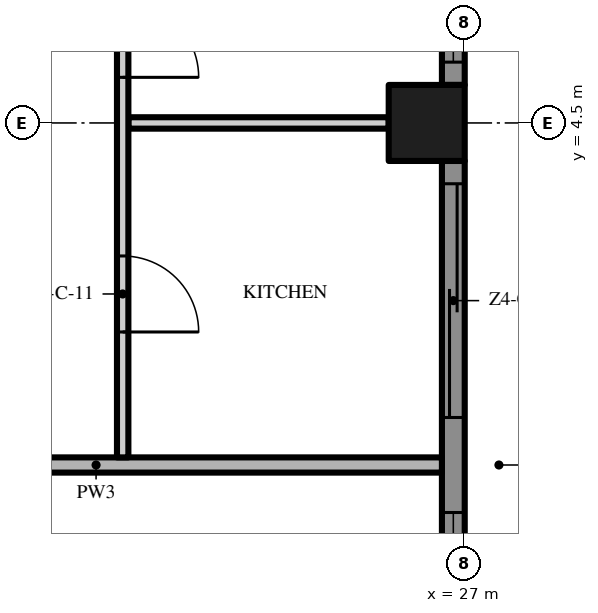
"""IFC4 building model, lengths in metres.
Left out: names, types, materials, properties, quantities, classifications, styles, units other than length and angle.
Written with IfcOpenShell. Run it as: python <this file> out.ifc"""

import sys

from ifc_helpers import new_model, si_unit, direction, frame, frame_2d, origin, origin_2d, place, context, subcontext, project, spatial, polyline, rectangle, outline, extrude, element, fill, save


model = new_model("IFC4")
c1 = context("Model", 3, precision=1e-05, world=origin(), true_north=direction((0.0, 1.0)))
c2 = subcontext(c1, "Body", "Model", "MODEL_VIEW")
j1 = project(units=[si_unit("LENGTHUNIT", "METRE"), si_unit("PLANEANGLEUNIT", "RADIAN")], contexts=[c1])
p1 = place(None, origin())
s1 = spatial("IfcSite", under=j1, at=p1, CompositionType="ELEMENT")
p2 = place(p1, origin())
s2 = spatial("IfcBuilding", under=s1, at=p2, CompositionType="ELEMENT")
p3 = place(p2, frame((0.0, 0.0, 207.2)))
s3 = spatial("IfcBuildingStorey", under=s2, at=p3, CompositionType="ELEMENT", Elevation=207.2)
p4 = place(p3, frame((26.5, 4.5, 0.0), z_axis=(0.0, 0.0, 1.0), x_axis=(1.0, 0.0, 0.0)))
e1 = element("IfcColumn", 1, at=p4, inside=s3, PredefinedType="COLUMN", context=c2, shape_type="SweptSolid", body=[
    extrude(rectangle(XDim=1.0, YDim=1.0, at=origin_2d()), origin(), (0.0, 0.0, 1.0), 3.5),
])
p5 = place(p3, frame((26.85, 4.0, 0.0), z_axis=(0.0, 0.0, 1.0), x_axis=(0.0, -1.0, 0.0)))
e2 = element("IfcWall", 2, at=p5, inside=s3, PredefinedType="SOLIDWALL", context=c2, shape_type="SweptSolid", body=[
    extrude(rectangle(XDim=8.0, YDim=0.3, at=frame_2d((4.0, 0.0))), origin(), (0.0, 0.0, 1.0), 3.5),
])
p6 = place(p5, frame((4.625, 0.0, 0.45)))
e3 = element("IfcOpeningElement", 3, at=p6, cuts=e2, PredefinedType="OPENING", context=c2, shape_type="SweptSolid", body=[
    extrude(rectangle(XDim=3.075, YDim=2.65, at=frame_2d((1.538, 1.325))), frame((0.0, 0.16, 0.0), z_axis=(0.0, -1.0, 0.0), x_axis=(1.0, 0.0, 0.0)), (0.0, 0.0, 1.0), 0.32),
])
p7 = place(p5, frame((0.3, 0.0, 0.0)))
e4 = element("IfcOpeningElement", 4, at=p7, cuts=e2, PredefinedType="OPENING", context=c2, shape_type="SweptSolid", body=[
    extrude(rectangle(XDim=3.075, YDim=2.4, at=frame_2d((1.538, 1.2))), frame((0.0, 0.16, 0.0), z_axis=(0.0, -1.0, 0.0), x_axis=(1.0, 0.0, 0.0)), (0.0, 0.0, 1.0), 0.32),
])
p8 = place(p3, frame((26.85, 13.0, 0.0), z_axis=(0.0, 0.0, 1.0), x_axis=(0.0, -1.0, 0.0)))
e5 = element("IfcWall", 5, at=p8, inside=s3, PredefinedType="SOLIDWALL", context=c2, shape_type="SweptSolid", body=[
    extrude(rectangle(XDim=8.0, YDim=0.3, at=frame_2d((4.0, 0.0))), origin(), (0.0, 0.0, 1.0), 3.5),
])
p9 = place(p8, frame((4.625, 0.0, 0.45)))
e6 = element("IfcOpeningElement", 6, at=p9, cuts=e5, PredefinedType="OPENING", context=c2, shape_type="SweptSolid", body=[
    extrude(rectangle(XDim=3.075, YDim=2.65, at=frame_2d((1.538, 1.325))), frame((0.0, 0.16, 0.0), z_axis=(0.0, -1.0, 0.0), x_axis=(1.0, 0.0, 0.0)), (0.0, 0.0, 1.0), 0.32),
])
p10 = place(p8, frame((0.3, 0.0, 0.45)))
e7 = element("IfcOpeningElement", 7, at=p10, cuts=e5, PredefinedType="OPENING", context=c2, shape_type="SweptSolid", body=[
    extrude(rectangle(XDim=3.075, YDim=2.65, at=frame_2d((1.538, 1.325))), frame((0.0, 0.16, 0.0), z_axis=(0.0, -1.0, 0.0), x_axis=(1.0, 0.0, 0.0)), (0.0, 0.0, 1.0), 0.32),
])
p11 = place(p3, origin())
e8 = element("IfcWall", 8, at=p11, inside=s3, PredefinedType="USERDEFINED", context=c2, shape_type="SweptSolid", body=[
    extrude(outline(polyline([(27.951, -18.0), (28.612, -16.5), (29.345, -15.0), (29.869, -13.5), (30.0, -12.375), (29.985, -12.0), (29.649, -10.5), (28.988, -9.0), (28.255, -7.5), (27.731, -6.0), (27.6, -4.875), (27.615, -4.5), (27.951, -3.0), (28.612, -1.5), (29.345, 0.0), (29.869, 1.5), (30.0, 2.625), (29.985, 3.0), (29.649, 4.5), (28.988, 6.0), (28.255, 7.5), (27.731, 9.0), (27.6, 10.125), (27.615, 10.5), (27.951, 12.0), (28.612, 13.5), (29.345, 15.0), (29.869, 16.5), (30.0, 17.625), (29.985, 18.0), (29.735, 17.99), (29.749, 17.635), (29.624, 16.556), (29.114, 15.096), (28.385, 13.605), (27.713, 12.079), (27.366, 10.533), (27.349, 10.115), (27.486, 8.944), (28.024, 7.404), (28.761, 5.895), (29.41, 4.421), (29.736, 2.967), (29.749, 2.635), (29.624, 1.556), (29.114, 0.096), (28.385, -1.395), (27.713, -2.921), (27.366, -4.467), (27.349, -4.885), (27.486, -6.056), (28.024, -7.596), (28.761, -9.105), (29.41, -10.579), (29.736, -12.033), (29.749, -12.365), (29.624, -13.444), (29.114, -14.904), (28.385, -16.395), (27.723, -17.899), (27.951, -18.0)])), origin(), (0.0, 0.0, 1.0), 0.9),
])
p12 = place(p3, frame((17.6, 0.0, 0.0), z_axis=(0.0, 0.0, 1.0), x_axis=(1.0, 0.0, 0.0)))
e9 = element("IfcWall", 9, at=p12, inside=s3, PredefinedType="PARTITIONING", context=c2, shape_type="SweptSolid", body=[
    extrude(rectangle(XDim=9.1, YDim=0.2, at=frame_2d((4.55, 0.0))), origin(), (0.0, 0.0, 1.0), 3.5),
])
p13 = place(p3, frame((22.575, 4.5, 0.0), z_axis=(0.0, 0.0, 1.0), x_axis=(1.0, 0.0, 0.0)))
e10 = element("IfcWall", 10, at=p13, inside=s3, PredefinedType="PARTITIONING", context=c2, shape_type="SweptSolid", body=[
    extrude(rectangle(XDim=3.425, YDim=0.15, at=frame_2d((1.712, 0.0))), origin(), (0.0, 0.0, 1.0), 3.5),
])
p14 = place(p3, frame((22.5, 17.5, 0.0), z_axis=(0.0, 0.0, 1.0), x_axis=(0.0, -1.0, 0.0)))
e11 = element("IfcWall", 11, at=p14, inside=s3, PredefinedType="PARTITIONING", context=c2, shape_type="SweptSolid", body=[
    extrude(rectangle(XDim=17.4, YDim=0.15, at=frame_2d((8.7, 0.0))), origin(), (0.0, 0.0, 1.0), 3.5),
])
p15 = place(p14, frame((14.75, 0.0, 0.0)))
e12 = element("IfcOpeningElement", 12, at=p15, cuts=e11, PredefinedType="OPENING", context=c2, shape_type="SweptSolid", body=[
    extrude(rectangle(XDim=1.0, YDim=2.4, at=frame_2d((0.5, 1.2))), frame((0.0, 0.085, 0.0), z_axis=(0.0, -1.0, 0.0), x_axis=(1.0, 0.0, 0.0)), (0.0, 0.0, 1.0), 0.17),
])
p16 = place(p14, frame((11.4, 0.0, 0.0)))
e13 = element("IfcOpeningElement", 13, at=p16, cuts=e11, PredefinedType="OPENING", context=c2, shape_type="SweptSolid", body=[
    extrude(rectangle(XDim=1.0, YDim=2.4, at=frame_2d((0.5, 1.2))), frame((0.0, 0.085, 0.0), z_axis=(0.0, -1.0, 0.0), x_axis=(1.0, 0.0, 0.0)), (0.0, 0.0, 1.0), 0.17),
])
p17 = place(p14, frame((4.25, 0.0, 0.0)))
e14 = element("IfcOpeningElement", 14, at=p17, cuts=e11, PredefinedType="OPENING", context=c2, shape_type="SweptSolid", body=[
    extrude(rectangle(XDim=1.0, YDim=2.4, at=frame_2d((0.5, 1.2))), frame((0.0, 0.085, 0.0), z_axis=(0.0, -1.0, 0.0), x_axis=(1.0, 0.0, 0.0)), (0.0, 0.0, 1.0), 0.17),
])
p18 = place(p6, origin())
e15 = element("IfcWindow", 15, at=p18, inside=s3, PartitioningType="SINGLE_PANEL", PredefinedType="WINDOW", context=c2, shape_type="SweptSolid", body=[
    extrude(rectangle(XDim=3.075, YDim=2.65, at=frame_2d((1.538, 1.325))), frame((0.0, 0.03, 0.0), z_axis=(0.0, -1.0, 0.0), x_axis=(1.0, 0.0, 0.0)), (0.0, 0.0, 1.0), 0.06),
])
fill(e3, e15)
p19 = place(p7, origin())
e16 = element("IfcDoor", 16, at=p19, inside=s3, OperationType="SINGLE_SWING_LEFT", PredefinedType="DOOR", context=c2, shape_type="SweptSolid", body=[
    extrude(rectangle(XDim=3.075, YDim=2.4, at=frame_2d((1.538, 1.2))), frame((0.0, 0.025, 0.0), z_axis=(0.0, -1.0, 0.0), x_axis=(1.0, 0.0, 0.0)), (0.0, 0.0, 1.0), 0.05),
])
fill(e4, e16)
p20 = place(p9, origin())
e17 = element("IfcWindow", 17, at=p20, inside=s3, PartitioningType="SINGLE_PANEL", PredefinedType="WINDOW", context=c2, shape_type="SweptSolid", body=[
    extrude(rectangle(XDim=3.075, YDim=2.65, at=frame_2d((1.538, 1.325))), frame((0.0, 0.03, 0.0), z_axis=(0.0, -1.0, 0.0), x_axis=(1.0, 0.0, 0.0)), (0.0, 0.0, 1.0), 0.06),
])
fill(e6, e17)
p21 = place(p15, origin())
e18 = element("IfcDoor", 18, at=p21, inside=s3, OperationType="SINGLE_SWING_RIGHT", PredefinedType="DOOR", context=c2, shape_type="SweptSolid", body=[
    extrude(rectangle(XDim=1.0, YDim=2.4, at=frame_2d((0.5, 1.2))), frame((0.0, 0.025, 0.0), z_axis=(0.0, -1.0, 0.0), x_axis=(1.0, 0.0, 0.0)), (0.0, 0.0, 1.0), 0.05),
])
fill(e12, e18)
p22 = place(p16, origin())
e19 = element("IfcDoor", 19, at=p22, inside=s3, OperationType="SINGLE_SWING_RIGHT", PredefinedType="DOOR", context=c2, shape_type="SweptSolid", body=[
    extrude(rectangle(XDim=1.0, YDim=2.4, at=frame_2d((0.5, 1.2))), frame((0.0, 0.025, 0.0), z_axis=(0.0, -1.0, 0.0), x_axis=(1.0, 0.0, 0.0)), (0.0, 0.0, 1.0), 0.05),
])
fill(e13, e19)
save(model, sys.argv[1])
